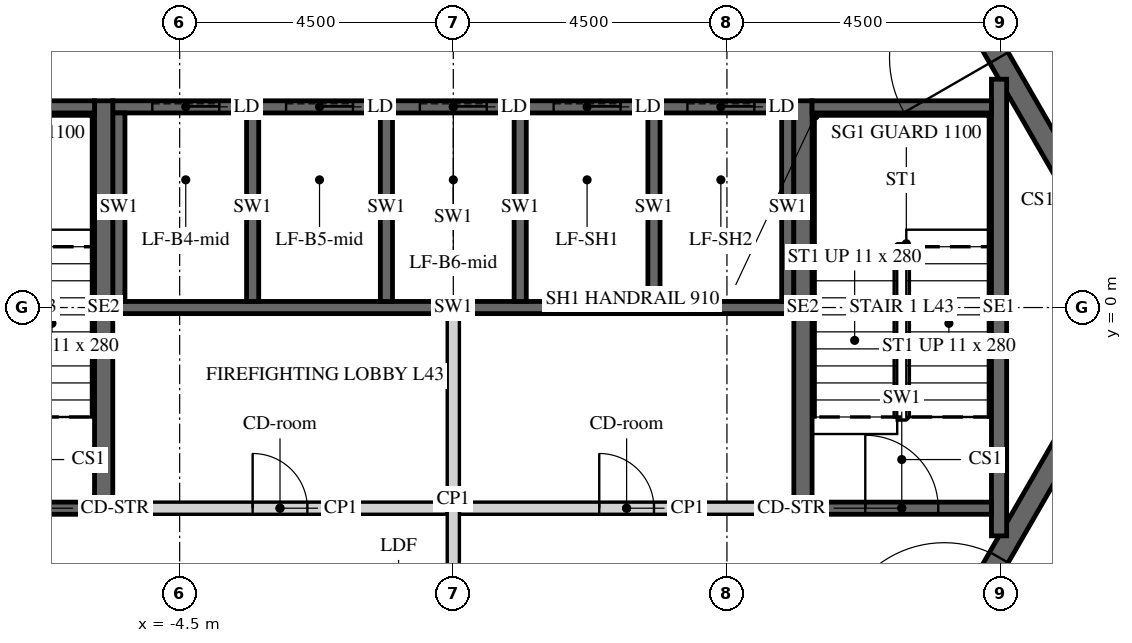
"""IFC4 building model, lengths in metres.
Left out: names, types, materials, properties, quantities, classifications, styles, units other than length and angle.
Written with IfcOpenShell. Run it as: python <this file> out.ifc"""

import sys

from ifc_helpers import new_model, si_unit, direction, frame, frame_2d, origin, place, context, subcontext, project, spatial, polyline, rectangle, outline, extrude, element, fill, save


model = new_model("IFC4")
c1 = context("Model", 3, precision=1e-05, world=origin(), true_north=direction((0.0, 1.0)))
c2 = subcontext(c1, "Body", "Model", "MODEL_VIEW")
j1 = project(units=[si_unit("LENGTHUNIT", "METRE"), si_unit("PLANEANGLEUNIT", "RADIAN")], contexts=[c1])
p1 = place(None, origin())
s1 = spatial("IfcSite", under=j1, at=p1, CompositionType="ELEMENT")
p2 = place(p1, origin())
s2 = spatial("IfcBuilding", under=s1, at=p2, CompositionType="ELEMENT")
p3 = place(p2, frame((0.0, 0.0, 183.9)))
s3 = spatial("IfcBuildingStorey", under=s2, at=p3, CompositionType="ELEMENT", Elevation=183.9)
p4 = place(p3, frame((7.361, -12.75, -0.15), z_axis=(0.0, 0.0, 1.0), x_axis=(0.50000571537, 0.866022103989, 0.0)))
e1 = element("IfcWall", 1, at=p4, inside=s3, PredefinedType="SHEAR", context=c2, shape_type="SweptSolid", body=[
    extrude(outline(polyline([(-0.144, -0.25), (14.867, -0.25), (14.578, 0.25), (0.144, 0.25), (-0.144, -0.25)])), origin(), (0.0, 0.0, 1.0), 3.9),
])
p5 = place(p4, frame((6.49, 0.0, 0.15)))
e2 = element("IfcOpeningElement", 2, at=p5, cuts=e1, PredefinedType="OPENING", context=c2, shape_type="SweptSolid", body=[
    extrude(rectangle(XDim=1.8, YDim=2.4, at=frame_2d((0.9, 1.2))), frame((0.0, 0.26, 0.0), z_axis=(0.0, -1.0, 0.0), x_axis=(1.0, 0.0, 0.0)), (0.0, 0.0, 1.0), 0.52),
])
p6 = place(p3, frame((14.722, 0.0, -0.15), z_axis=(0.0, 0.0, 1.0), x_axis=(-0.50000571537, 0.866022103989, 0.0)))
e3 = element("IfcWall", 3, at=p6, inside=s3, PredefinedType="SHEAR", context=c2, shape_type="SweptSolid", body=[
    extrude(outline(polyline([(-0.144, -0.25), (14.867, -0.25), (14.578, 0.25), (0.144, 0.25), (-0.144, -0.25)])), origin(), (0.0, 0.0, 1.0), 3.9),
])
p7 = place(p6, frame((6.432, 0.0, 0.15)))
e4 = element("IfcOpeningElement", 4, at=p7, cuts=e3, PredefinedType="OPENING", context=c2, shape_type="SweptSolid", body=[
    extrude(rectangle(XDim=1.8, YDim=2.4, at=frame_2d((0.9, 1.2))), frame((0.0, 0.26, 0.0), z_axis=(0.0, -1.0, 0.0), x_axis=(1.0, 0.0, 0.0)), (0.0, 0.0, 1.0), 0.52),
])
p8 = place(p3, frame((-5.673, 9.825, -0.15), z_axis=(0.0, 0.0, 1.0), x_axis=(-0.499995046907, -0.866028263435, 0.0)))
e5 = element("IfcWall", 5, at=p8, inside=s3, PredefinedType="SHEAR", context=c2, shape_type="SweptSolid", body=[
    extrude(outline(polyline([(-0.101, -0.175), (11.446, -0.175), (11.244, 0.175), (0.101, 0.175), (-0.101, -0.175)])), origin(), (0.0, 0.0, 1.0), 3.9),
])
p9 = place(p8, frame((4.801, 0.0, 0.15)))
e6 = element("IfcOpeningElement", 6, at=p9, cuts=e5, PredefinedType="OPENING", context=c2, shape_type="SweptSolid", body=[
    extrude(rectangle(XDim=1.8, YDim=2.4, at=frame_2d((0.9, 1.2))), frame((0.0, 0.185, 0.0), z_axis=(0.0, -1.0, 0.0), x_axis=(1.0, 0.0, 0.0)), (0.0, 0.0, 1.0), 0.37),
])
p10 = place(p3, frame((-11.345, 0.0, -0.15), z_axis=(0.0, 0.0, 1.0), x_axis=(0.499995046907, -0.866028263435, 0.0)))
e7 = element("IfcWall", 7, at=p10, inside=s3, PredefinedType="SHEAR", context=c2, shape_type="SweptSolid", body=[
    extrude(outline(polyline([(-0.101, -0.175), (11.446, -0.175), (11.244, 0.175), (0.101, 0.175), (-0.101, -0.175)])), origin(), (0.0, 0.0, 1.0), 3.9),
])
p11 = place(p10, frame((4.744, 0.0, 0.15)))
e8 = element("IfcOpeningElement", 8, at=p11, cuts=e7, PredefinedType="OPENING", context=c2, shape_type="SweptSolid", body=[
    extrude(rectangle(XDim=1.8, YDim=2.4, at=frame_2d((0.9, 1.2))), frame((0.0, 0.185, 0.0), z_axis=(0.0, -1.0, 0.0), x_axis=(1.0, 0.0, 0.0)), (0.0, 0.0, 1.0), 0.37),
])
p12 = place(p3, frame((5.673, -9.825, -0.15), z_axis=(0.0, 0.0, 1.0), x_axis=(0.499995046907, 0.866028263435, 0.0)))
e9 = element("IfcWall", 9, at=p12, inside=s3, PredefinedType="SHEAR", context=c2, shape_type="SweptSolid", body=[
    extrude(outline(polyline([(-0.101, -0.175), (11.446, -0.175), (11.244, 0.175), (0.101, 0.175), (-0.101, -0.175)])), origin(), (0.0, 0.0, 1.0), 3.9),
])
p13 = place(p12, frame((4.801, 0.0, 0.15)))
e10 = element("IfcOpeningElement", 10, at=p13, cuts=e9, PredefinedType="OPENING", context=c2, shape_type="SweptSolid", body=[
    extrude(rectangle(XDim=1.8, YDim=2.4, at=frame_2d((0.9, 1.2))), frame((0.0, 0.185, 0.0), z_axis=(0.0, -1.0, 0.0), x_axis=(1.0, 0.0, 0.0)), (0.0, 0.0, 1.0), 0.37),
])
p14 = place(p3, frame((11.345, 0.0, -0.15), z_axis=(0.0, 0.0, 1.0), x_axis=(-0.499995046907, 0.866028263435, 0.0)))
e11 = element("IfcWall", 11, at=p14, inside=s3, PredefinedType="SHEAR", context=c2, shape_type="SweptSolid", body=[
    extrude(outline(polyline([(-0.101, -0.175), (11.446, -0.175), (11.244, 0.175), (0.101, 0.175), (-0.101, -0.175)])), origin(), (0.0, 0.0, 1.0), 3.9),
])
p15 = place(p14, frame((4.744, 0.0, 0.15)))
e12 = element("IfcOpeningElement", 12, at=p15, cuts=e11, PredefinedType="OPENING", context=c2, shape_type="SweptSolid", body=[
    extrude(rectangle(XDim=1.8, YDim=2.4, at=frame_2d((0.9, 1.2))), frame((0.0, 0.185, 0.0), z_axis=(0.0, -1.0, 0.0), x_axis=(1.0, 0.0, 0.0)), (0.0, 0.0, 1.0), 0.37),
])
p16 = place(p3, frame((-5.6, 3.3, -0.25), z_axis=(0.0, 0.0, 1.0), x_axis=(1.0, 0.0, 0.0)))
e13 = element("IfcWall", 13, at=p16, inside=s3, PredefinedType="SHEAR", context=c2, shape_type="SweptSolid", body=[
    extrude(rectangle(XDim=11.2, YDim=0.2, at=frame_2d((5.6, 0.0))), origin(), (0.0, 0.0, 1.0), 3.9),
])
p17 = place(p16, frame((0.65, 0.0, 0.25)))
e14 = element("IfcOpeningElement", 14, at=p17, cuts=e13, PredefinedType="OPENING", context=c2, shape_type="SweptSolid", body=[
    extrude(rectangle(XDim=1.1, YDim=2.1, at=frame_2d((0.55, 1.05))), frame((0.0, 0.11, 0.0), z_axis=(0.0, -1.0, 0.0), x_axis=(1.0, 0.0, 0.0)), (0.0, 0.0, 1.0), 0.22),
])
p18 = place(p16, frame((2.85, 0.0, 0.25)))
e15 = element("IfcOpeningElement", 15, at=p18, cuts=e13, PredefinedType="OPENING", context=c2, shape_type="SweptSolid", body=[
    extrude(rectangle(XDim=1.1, YDim=2.1, at=frame_2d((0.55, 1.05))), frame((0.0, 0.11, 0.0), z_axis=(0.0, -1.0, 0.0), x_axis=(1.0, 0.0, 0.0)), (0.0, 0.0, 1.0), 0.22),
])
p19 = place(p16, frame((5.05, 0.0, 0.25)))
e16 = element("IfcOpeningElement", 16, at=p19, cuts=e13, PredefinedType="OPENING", context=c2, shape_type="SweptSolid", body=[
    extrude(rectangle(XDim=1.1, YDim=2.1, at=frame_2d((0.55, 1.05))), frame((0.0, 0.11, 0.0), z_axis=(0.0, -1.0, 0.0), x_axis=(1.0, 0.0, 0.0)), (0.0, 0.0, 1.0), 0.22),
])
p20 = place(p16, frame((7.25, 0.0, 0.25)))
e17 = element("IfcOpeningElement", 17, at=p20, cuts=e13, PredefinedType="OPENING", context=c2, shape_type="SweptSolid", body=[
    extrude(rectangle(XDim=1.1, YDim=2.1, at=frame_2d((0.55, 1.05))), frame((0.0, 0.11, 0.0), z_axis=(0.0, -1.0, 0.0), x_axis=(1.0, 0.0, 0.0)), (0.0, 0.0, 1.0), 0.22),
])
p21 = place(p16, frame((9.45, 0.0, 0.25)))
e18 = element("IfcOpeningElement", 18, at=p21, cuts=e13, PredefinedType="OPENING", context=c2, shape_type="SweptSolid", body=[
    extrude(rectangle(XDim=1.1, YDim=2.1, at=frame_2d((0.55, 1.05))), frame((0.0, 0.11, 0.0), z_axis=(0.0, -1.0, 0.0), x_axis=(1.0, 0.0, 0.0)), (0.0, 0.0, 1.0), 0.22),
])
p22 = place(p3, frame((-5.6, 0.0, -0.25), z_axis=(0.0, 0.0, 1.0), x_axis=(1.0, 0.0, 0.0)))
e19 = element("IfcWall", 19, at=p22, inside=s3, PredefinedType="SHEAR", context=c2, shape_type="SweptSolid", body=[
    extrude(rectangle(XDim=11.2, YDim=0.2, at=frame_2d((5.6, 0.0))), origin(), (0.0, 0.0, 1.0), 3.9),
])
for number, where, z_axis, x_axis in (
    (20, (-5.5, 0.1, -0.25), (0.0, 0.0, 1.0), (0.0, 1.0, 0.0)),
    (21, (-3.3, 0.1, -0.25), (0.0, 0.0, 1.0), (0.0, 1.0, 0.0)),
    (22, (-1.1, 0.1, -0.25), (0.0, 0.0, 1.0), (0.0, 1.0, 0.0)),
    (23, (1.1, 0.1, -0.25), (0.0, 0.0, 1.0), (0.0, 1.0, 0.0)),
    (24, (3.3, 0.1, -0.25), (0.0, 0.0, 1.0), (0.0, 1.0, 0.0)),
    (25, (5.5, 0.1, -0.25), (0.0, 0.0, 1.0), (0.0, 1.0, 0.0)),
):
    element("IfcWall", number, at=place(p3, frame(where, z_axis=z_axis, x_axis=x_axis)), inside=s3, PredefinedType="SHEAR", context=c2, shape_type="SweptSolid", body=[
        extrude(rectangle(XDim=3.1, YDim=0.2, at=frame_2d((1.55, 0.0))), origin(), (0.0, 0.0, 1.0), 3.9),
    ])
p23 = place(p3, frame((-5.6, -3.3, 0.0), z_axis=(0.0, 0.0, 1.0), x_axis=(1.0, 0.0, 0.0)))
e26 = element("IfcWall", 26, at=p23, inside=s3, PredefinedType="PARTITIONING", context=c2, shape_type="SweptSolid", body=[
    extrude(rectangle(XDim=5.5, YDim=0.2, at=frame_2d((2.75, 0.0))), origin(), (0.0, 0.0, 1.0), 3.65),
])
p24 = place(p23, frame((2.3, 0.0, 0.0)))
e27 = element("IfcOpeningElement", 27, at=p24, cuts=e26, PredefinedType="OPENING", context=c2, shape_type="SweptSolid", body=[
    extrude(rectangle(XDim=0.9, YDim=2.1, at=frame_2d((0.45, 1.05))), frame((0.0, 0.11, 0.0), z_axis=(0.0, -1.0, 0.0), x_axis=(1.0, 0.0, 0.0)), (0.0, 0.0, 1.0), 0.22),
])
p25 = place(p3, frame((0.1, -3.3, 0.0), z_axis=(0.0, 0.0, 1.0), x_axis=(1.0, 0.0, 0.0)))
e28 = element("IfcWall", 28, at=p25, inside=s3, PredefinedType="PARTITIONING", context=c2, shape_type="SweptSolid", body=[
    extrude(rectangle(XDim=5.5, YDim=0.2, at=frame_2d((2.75, 0.0))), origin(), (0.0, 0.0, 1.0), 3.65),
])
p26 = place(p25, frame((2.3, 0.0, 0.0)))
e29 = element("IfcOpeningElement", 29, at=p26, cuts=e28, PredefinedType="OPENING", context=c2, shape_type="SweptSolid", body=[
    extrude(rectangle(XDim=0.9, YDim=2.1, at=frame_2d((0.45, 1.05))), frame((0.0, 0.11, 0.0), z_axis=(0.0, -1.0, 0.0), x_axis=(1.0, 0.0, 0.0)), (0.0, 0.0, 1.0), 0.22),
])
p27 = place(p3, frame((0.0, -6.2, 0.0), z_axis=(0.0, 0.0, 1.0), x_axis=(0.0, 1.0, 0.0)))
e30 = element("IfcWall", 30, at=p27, inside=s3, PredefinedType="PARTITIONING", context=c2, shape_type="SweptSolid", body=[
    extrude(rectangle(XDim=6.1, YDim=0.2, at=frame_2d((3.05, 0.0))), origin(), (0.0, 0.0, 1.0), 3.65),
])
p28 = place(p3, frame((5.75, -3.4, -0.25), z_axis=(0.0, 0.0, 1.0), x_axis=(0.0, 1.0, 0.0)))
e31 = element("IfcWall", 31, at=p28, inside=s3, PredefinedType="SHEAR", context=c2, shape_type="SweptSolid", body=[
    extrude(rectangle(XDim=6.8, YDim=0.3, at=frame_2d((3.4, 0.0))), origin(), (0.0, 0.0, 1.0), 3.9),
])
p29 = place(p3, frame((8.975, -3.755, -0.25), z_axis=(0.0, 0.0, 1.0), x_axis=(0.0, 1.0, 0.0)))
e32 = element("IfcWall", 32, at=p29, inside=s3, PredefinedType="SHEAR", context=c2, shape_type="SweptSolid", body=[
    extrude(rectangle(XDim=7.51, YDim=0.25, at=frame_2d((3.755, 0.0))), origin(), (0.0, 0.0, 1.0), 3.9),
])
p30 = place(p3, frame((5.9, 3.3, -0.25), z_axis=(0.0, 0.0, 1.0), x_axis=(1.0, 0.0, 0.0)))
e33 = element("IfcWall", 33, at=p30, inside=s3, PredefinedType="SHEAR", context=c2, shape_type="SweptSolid", body=[
    extrude(rectangle(XDim=2.95, YDim=0.2, at=frame_2d((1.475, 0.0))), origin(), (0.0, 0.0, 1.0), 3.9),
])
p31 = place(p3, frame((5.9, -3.3, -0.25), z_axis=(0.0, 0.0, 1.0), x_axis=(1.0, 0.0, 0.0)))
e34 = element("IfcWall", 34, at=p31, inside=s3, PredefinedType="SHEAR", context=c2, shape_type="SweptSolid", body=[
    extrude(rectangle(XDim=2.95, YDim=0.2, at=frame_2d((1.475, 0.0))), origin(), (0.0, 0.0, 1.0), 3.9),
])
p32 = place(p31, frame((0.875, 0.0, 0.25)))
e35 = element("IfcOpeningElement", 35, at=p32, cuts=e34, PredefinedType="OPENING", context=c2, shape_type="SweptSolid", body=[
    extrude(rectangle(XDim=1.2, YDim=2.4, at=frame_2d((0.6, 1.2))), frame((0.0, 0.11, 0.0), z_axis=(0.0, -1.0, 0.0), x_axis=(1.0, 0.0, 0.0)), (0.0, 0.0, 1.0), 0.22),
])
p33 = place(p3, frame((-5.75, -3.4, -0.25), z_axis=(0.0, 0.0, 1.0), x_axis=(0.0, 1.0, 0.0)))
e36 = element("IfcWall", 36, at=p33, inside=s3, PredefinedType="SHEAR", context=c2, shape_type="SweptSolid", body=[
    extrude(rectangle(XDim=6.8, YDim=0.3, at=frame_2d((3.4, 0.0))), origin(), (0.0, 0.0, 1.0), 3.9),
])
p34 = place(p3, frame((-8.85, 3.3, -0.25), z_axis=(0.0, 0.0, 1.0), x_axis=(1.0, 0.0, 0.0)))
e37 = element("IfcWall", 37, at=p34, inside=s3, PredefinedType="SHEAR", context=c2, shape_type="SweptSolid", body=[
    extrude(rectangle(XDim=2.95, YDim=0.2, at=frame_2d((1.475, 0.0))), origin(), (0.0, 0.0, 1.0), 3.9),
])
p35 = place(p3, frame((-8.85, -3.3, -0.25), z_axis=(0.0, 0.0, 1.0), x_axis=(1.0, 0.0, 0.0)))
e38 = element("IfcWall", 38, at=p35, inside=s3, PredefinedType="SHEAR", context=c2, shape_type="SweptSolid", body=[
    extrude(rectangle(XDim=2.95, YDim=0.2, at=frame_2d((1.475, 0.0))), origin(), (0.0, 0.0, 1.0), 3.9),
])
p36 = place(p35, frame((0.875, 0.0, 0.25)))
e39 = element("IfcOpeningElement", 39, at=p36, cuts=e38, PredefinedType="OPENING", context=c2, shape_type="SweptSolid", body=[
    extrude(rectangle(XDim=1.2, YDim=2.4, at=frame_2d((0.6, 1.2))), frame((0.0, 0.11, 0.0), z_axis=(0.0, -1.0, 0.0), x_axis=(1.0, 0.0, 0.0)), (0.0, 0.0, 1.0), 0.22),
])
p37 = place(p3, frame((9.887, -12.875, 0.0), z_axis=(0.0, 0.0, 1.0), x_axis=(0.499998228944, 0.866026426302, 0.0)))
e40 = element("IfcWall", 40, at=p37, inside=s3, PredefinedType="PARTITIONING", context=c2, shape_type="SweptSolid", body=[
    extrude(rectangle(XDim=14.867, YDim=0.15, at=frame_2d((7.433, 0.0))), origin(), (0.0, 0.0, 1.0), 2.988),
])
p38 = place(p37, frame((8.224, 0.0, 0.0)))
e41 = element("IfcOpeningElement", 41, at=p38, cuts=e40, PredefinedType="OPENING", context=c2, shape_type="SweptSolid", body=[
    extrude(rectangle(XDim=1.0, YDim=2.1, at=frame_2d((0.5, 1.05))), frame((0.0, 0.085, 0.0), z_axis=(0.0, -1.0, 0.0), x_axis=(1.0, 0.0, 0.0)), (0.0, 0.0, 1.0), 0.17),
])
p39 = place(p37, frame((13.717, 0.0, 0.0)))
e42 = element("IfcOpeningElement", 42, at=p39, cuts=e40, PredefinedType="OPENING", context=c2, shape_type="SweptSolid", body=[
    extrude(rectangle(XDim=1.0, YDim=2.1, at=frame_2d((0.5, 1.05))), frame((0.0, 0.085, 0.0), z_axis=(0.0, -1.0, 0.0), x_axis=(1.0, 0.0, 0.0)), (0.0, 0.0, 1.0), 0.17),
])
p40 = place(p3, frame((17.277, 0.075, 0.0), z_axis=(0.0, 0.0, 1.0), x_axis=(-0.499998228944, 0.866026426302, 0.0)))
e43 = element("IfcWall", 43, at=p40, inside=s3, PredefinedType="PARTITIONING", context=c2, shape_type="SweptSolid", body=[
    extrude(rectangle(XDim=14.867, YDim=0.15, at=frame_2d((7.433, 0.0))), origin(), (0.0, 0.0, 1.0), 2.988),
])
p41 = place(p40, frame((9.398, 0.0, 0.0)))
e44 = element("IfcOpeningElement", 44, at=p41, cuts=e43, PredefinedType="OPENING", context=c2, shape_type="SweptSolid", body=[
    extrude(rectangle(XDim=1.0, YDim=2.1, at=frame_2d((0.5, 1.05))), frame((0.0, 0.085, 0.0), z_axis=(0.0, -1.0, 0.0), x_axis=(1.0, 0.0, 0.0)), (0.0, 0.0, 1.0), 0.17),
])
p42 = place(p15, origin())
e45 = element("IfcDoor", 45, at=p42, inside=s3, OperationType="DOUBLE_DOOR_SINGLE_SWING", PredefinedType="DOOR", context=c2, shape_type="SweptSolid", body=[
    extrude(rectangle(XDim=1.8, YDim=2.4, at=frame_2d((0.9, 1.2))), frame((0.0, 0.025, 0.0), z_axis=(0.0, -1.0, 0.0), x_axis=(1.0, 0.0, 0.0)), (0.0, 0.0, 1.0), 0.05),
])
fill(e12, e45)
p43 = place(p13, origin())
e46 = element("IfcDoor", 46, at=p43, inside=s3, OperationType="DOUBLE_DOOR_SINGLE_SWING", PredefinedType="DOOR", context=c2, shape_type="SweptSolid", body=[
    extrude(rectangle(XDim=1.8, YDim=2.4, at=frame_2d((0.9, 1.2))), frame((0.0, 0.025, 0.0), z_axis=(0.0, -1.0, 0.0), x_axis=(1.0, 0.0, 0.0)), (0.0, 0.0, 1.0), 0.05),
])
fill(e10, e46)
p44 = place(p24, origin())
e47 = element("IfcDoor", 47, at=p44, inside=s3, OperationType="SINGLE_SWING_LEFT", PredefinedType="DOOR", context=c2, shape_type="SweptSolid", body=[
    extrude(rectangle(XDim=0.9, YDim=2.1, at=frame_2d((0.45, 1.05))), frame((0.0, 0.025, 0.0), z_axis=(0.0, -1.0, 0.0), x_axis=(1.0, 0.0, 0.0)), (0.0, 0.0, 1.0), 0.05),
])
fill(e27, e47)
p45 = place(p26, origin())
e48 = element("IfcDoor", 48, at=p45, inside=s3, OperationType="SINGLE_SWING_LEFT", PredefinedType="DOOR", context=c2, shape_type="SweptSolid", body=[
    extrude(rectangle(XDim=0.9, YDim=2.1, at=frame_2d((0.45, 1.05))), frame((0.0, 0.025, 0.0), z_axis=(0.0, -1.0, 0.0), x_axis=(1.0, 0.0, 0.0)), (0.0, 0.0, 1.0), 0.05),
])
fill(e29, e48)
p46 = place(p32, origin())
e49 = element("IfcDoor", 49, at=p46, inside=s3, OperationType="SINGLE_SWING_LEFT", PredefinedType="DOOR", context=c2, shape_type="SweptSolid", body=[
    extrude(rectangle(XDim=1.2, YDim=2.4, at=frame_2d((0.6, 1.2))), frame((0.0, 0.025, 0.0), z_axis=(0.0, -1.0, 0.0), x_axis=(1.0, 0.0, 0.0)), (0.0, 0.0, 1.0), 0.05),
])
fill(e35, e49)
p47 = place(p17, origin())
e50 = element("IfcDoor", 50, at=p47, inside=s3, OperationType="SLIDING_TO_LEFT", PredefinedType="DOOR", context=c2, shape_type="SweptSolid", body=[
    extrude(rectangle(XDim=1.1, YDim=2.1, at=frame_2d((0.55, 1.05))), frame((0.0, 0.025, 0.0), z_axis=(0.0, -1.0, 0.0), x_axis=(1.0, 0.0, 0.0)), (0.0, 0.0, 1.0), 0.05),
])
fill(e14, e50)
p48 = place(p18, origin())
e51 = element("IfcDoor", 51, at=p48, inside=s3, OperationType="SLIDING_TO_LEFT", PredefinedType="DOOR", context=c2, shape_type="SweptSolid", body=[
    extrude(rectangle(XDim=1.1, YDim=2.1, at=frame_2d((0.55, 1.05))), frame((0.0, 0.025, 0.0), z_axis=(0.0, -1.0, 0.0), x_axis=(1.0, 0.0, 0.0)), (0.0, 0.0, 1.0), 0.05),
])
fill(e15, e51)
p49 = place(p19, origin())
e52 = element("IfcDoor", 52, at=p49, inside=s3, OperationType="SLIDING_TO_LEFT", PredefinedType="DOOR", context=c2, shape_type="SweptSolid", body=[
    extrude(rectangle(XDim=1.1, YDim=2.1, at=frame_2d((0.55, 1.05))), frame((0.0, 0.025, 0.0), z_axis=(0.0, -1.0, 0.0), x_axis=(1.0, 0.0, 0.0)), (0.0, 0.0, 1.0), 0.05),
])
fill(e16, e52)
p50 = place(p20, origin())
e53 = element("IfcDoor", 53, at=p50, inside=s3, OperationType="SLIDING_TO_LEFT", PredefinedType="DOOR", context=c2, shape_type="SweptSolid", body=[
    extrude(rectangle(XDim=1.1, YDim=2.1, at=frame_2d((0.55, 1.05))), frame((0.0, 0.025, 0.0), z_axis=(0.0, -1.0, 0.0), x_axis=(1.0, 0.0, 0.0)), (0.0, 0.0, 1.0), 0.05),
])
fill(e17, e53)
p51 = place(p21, origin())
e54 = element("IfcDoor", 54, at=p51, inside=s3, OperationType="SLIDING_TO_LEFT", PredefinedType="DOOR", context=c2, shape_type="SweptSolid", body=[
    extrude(rectangle(XDim=1.1, YDim=2.1, at=frame_2d((0.55, 1.05))), frame((0.0, 0.025, 0.0), z_axis=(0.0, -1.0, 0.0), x_axis=(1.0, 0.0, 0.0)), (0.0, 0.0, 1.0), 0.05),
])
fill(e18, e54)
save(model, sys.argv[1])
